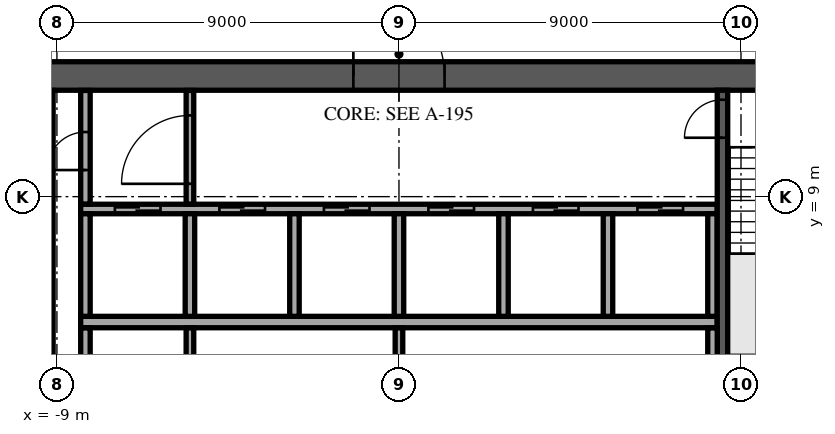
"""IFC4 building model, lengths in metres.
Left out: names, types, materials, properties, quantities, classifications, styles, units other than length and angle.
Written with IfcOpenShell. Run it as: python <this file> out.ifc"""

import sys

from ifc_helpers import new_model, si_unit, direction, frame, frame_2d, origin, place, context, subcontext, project, spatial, rectangle, extrude, element, fill, save


model = new_model("IFC4")
c1 = context("Model", 3, precision=1e-05, world=origin(), true_north=direction((0.0, 1.0)))
c2 = subcontext(c1, "Body", "Model", "MODEL_VIEW")
j1 = project(units=[si_unit("LENGTHUNIT", "METRE"), si_unit("PLANEANGLEUNIT", "RADIAN")], contexts=[c1])
p1 = place(None, origin())
s1 = spatial("IfcSite", under=j1, at=p1, CompositionType="ELEMENT")
p2 = place(p1, origin())
s2 = spatial("IfcBuilding", under=s1, at=p2, CompositionType="ELEMENT")
p3 = place(p2, frame((0.0, 0.0, 242.9)))
s3 = spatial("IfcBuildingStorey", under=s2, at=p3, CompositionType="ELEMENT", Elevation=242.9)
p4 = place(p3, frame((-12.55, 12.175, 0.0), z_axis=(0.0, 0.0, 1.0), x_axis=(1.0, 0.0, 0.0)))
e1 = element("IfcWall", 1, at=p4, inside=s3, PredefinedType="SHEAR", context=c2, shape_type="SweptSolid", body=[
    extrude(rectangle(XDim=25.1, YDim=0.75, at=frame_2d((12.55, 0.0))), origin(), (0.0, 0.0, 1.0), 3.64),
])
p5 = place(p4, frame((11.35, 0.0, 0.0)))
e2 = element("IfcOpeningElement", 2, at=p5, cuts=e1, PredefinedType="OPENING", context=c2, shape_type="SweptSolid", body=[
    extrude(rectangle(XDim=2.4, YDim=2.4, at=frame_2d((1.2, 1.2))), frame((0.0, 0.385, 0.0), z_axis=(0.0, -1.0, 0.0), x_axis=(1.0, 0.0, 0.0)), (0.0, 0.0, 1.0), 0.77),
])
p6 = place(p4, frame((22.175, 0.0, 0.0)))
e3 = element("IfcOpeningElement", 3, at=p6, cuts=e1, PredefinedType="OPENING", context=c2, shape_type="SweptSolid", body=[
    extrude(rectangle(XDim=1.2, YDim=2.1, at=frame_2d((0.6, 1.05))), frame((0.0, 0.385, 0.0), z_axis=(0.0, -1.0, 0.0), x_axis=(1.0, 0.0, 0.0)), (0.0, 0.0, 1.0), 0.77),
])
p7 = place(p4, frame((1.15, 0.0, 0.0)))
e4 = element("IfcOpeningElement", 4, at=p7, cuts=e1, PredefinedType="OPENING", context=c2, shape_type="SweptSolid", body=[
    extrude(rectangle(XDim=1.0, YDim=2.1, at=frame_2d((0.5, 1.05))), frame((0.0, 0.385, 0.0), z_axis=(0.0, -1.0, 0.0), x_axis=(1.0, 0.0, 0.0)), (0.0, 0.0, 1.0), 0.77),
])
p8 = place(p3, frame((-8.375, 5.7, 0.0), z_axis=(0.0, 0.0, 1.0), x_axis=(1.0, 0.0, 0.0)))
e5 = element("IfcWall", 5, at=p8, inside=s3, PredefinedType="SOLIDWALL", context=c2, shape_type="SweptSolid", body=[
    extrude(rectangle(XDim=16.75, YDim=0.3, at=frame_2d((8.375, 0.0))), origin(), (0.0, 0.0, 1.0), 3.64),
])
p9 = place(p3, frame((-8.375, 8.675, 0.0), z_axis=(0.0, 0.0, 1.0), x_axis=(1.0, 0.0, 0.0)))
e6 = element("IfcWall", 6, at=p9, inside=s3, PredefinedType="SOLIDWALL", context=c2, shape_type="SweptSolid", body=[
    extrude(rectangle(XDim=16.75, YDim=0.25, at=frame_2d((8.375, 0.0))), origin(), (0.0, 0.0, 1.0), 3.64),
])
p10 = place(p9, frame((0.9, 0.0, 0.0)))
e7 = element("IfcOpeningElement", 7, at=p10, cuts=e6, PredefinedType="OPENING", context=c2, shape_type="SweptSolid", body=[
    extrude(rectangle(XDim=1.2, YDim=2.1, at=frame_2d((0.6, 1.05))), frame((0.0, 0.135, 0.0), z_axis=(0.0, -1.0, 0.0), x_axis=(1.0, 0.0, 0.0)), (0.0, 0.0, 1.0), 0.27),
])
p11 = place(p9, frame((3.65, 0.0, 0.0)))
e8 = element("IfcOpeningElement", 8, at=p11, cuts=e6, PredefinedType="OPENING", context=c2, shape_type="SweptSolid", body=[
    extrude(rectangle(XDim=1.2, YDim=2.1, at=frame_2d((0.6, 1.05))), frame((0.0, 0.135, 0.0), z_axis=(0.0, -1.0, 0.0), x_axis=(1.0, 0.0, 0.0)), (0.0, 0.0, 1.0), 0.27),
])
p12 = place(p9, frame((6.4, 0.0, 0.0)))
e9 = element("IfcOpeningElement", 9, at=p12, cuts=e6, PredefinedType="OPENING", context=c2, shape_type="SweptSolid", body=[
    extrude(rectangle(XDim=1.2, YDim=2.1, at=frame_2d((0.6, 1.05))), frame((0.0, 0.135, 0.0), z_axis=(0.0, -1.0, 0.0), x_axis=(1.0, 0.0, 0.0)), (0.0, 0.0, 1.0), 0.27),
])
p13 = place(p9, frame((9.15, 0.0, 0.0)))
e10 = element("IfcOpeningElement", 10, at=p13, cuts=e6, PredefinedType="OPENING", context=c2, shape_type="SweptSolid", body=[
    extrude(rectangle(XDim=1.2, YDim=2.1, at=frame_2d((0.6, 1.05))), frame((0.0, 0.135, 0.0), z_axis=(0.0, -1.0, 0.0), x_axis=(1.0, 0.0, 0.0)), (0.0, 0.0, 1.0), 0.27),
])
p14 = place(p9, frame((11.9, 0.0, 0.0)))
e11 = element("IfcOpeningElement", 11, at=p14, cuts=e6, PredefinedType="OPENING", context=c2, shape_type="SweptSolid", body=[
    extrude(rectangle(XDim=1.2, YDim=2.1, at=frame_2d((0.6, 1.05))), frame((0.0, 0.135, 0.0), z_axis=(0.0, -1.0, 0.0), x_axis=(1.0, 0.0, 0.0)), (0.0, 0.0, 1.0), 0.27),
])
p15 = place(p9, frame((14.65, 0.0, 0.0)))
e12 = element("IfcOpeningElement", 12, at=p15, cuts=e6, PredefinedType="OPENING", context=c2, shape_type="SweptSolid", body=[
    extrude(rectangle(XDim=1.2, YDim=2.1, at=frame_2d((0.6, 1.05))), frame((0.0, 0.135, 0.0), z_axis=(0.0, -1.0, 0.0), x_axis=(1.0, 0.0, 0.0)), (0.0, 0.0, 1.0), 0.27),
])
for number, where, z_axis, x_axis in (
    (13, (-8.25, 5.85, 0.0), (0.0, 0.0, 1.0), (0.0, 1.0, 0.0)),
    (14, (-5.5, 5.85, 0.0), (0.0, 0.0, 1.0), (0.0, 1.0, 0.0)),
    (15, (-2.75, 5.85, 0.0), (0.0, 0.0, 1.0), (0.0, 1.0, 0.0)),
    (16, (0.0, 5.85, 0.0), (0.0, 0.0, 1.0), (0.0, 1.0, 0.0)),
    (17, (2.75, 5.85, 0.0), (0.0, 0.0, 1.0), (0.0, 1.0, 0.0)),
    (18, (5.5, 5.85, 0.0), (0.0, 0.0, 1.0), (0.0, 1.0, 0.0)),
    (19, (8.25, 5.85, 0.0), (0.0, 0.0, 1.0), (0.0, 1.0, 0.0)),
):
    element("IfcWall", number, at=place(p3, frame(where, z_axis=z_axis, x_axis=x_axis)), inside=s3, PredefinedType="SOLIDWALL", context=c2, shape_type="SweptSolid", body=[
        extrude(rectangle(XDim=2.7, YDim=0.25, at=frame_2d((1.35, 0.0))), origin(), (0.0, 0.0, 1.0), 3.64),
    ])
p16 = place(p3, frame((8.512, 4.55, 0.0), z_axis=(0.0, 0.0, 1.0), x_axis=(0.0, 1.0, 0.0)))
e20 = element("IfcWall", 20, at=p16, inside=s3, PredefinedType="SOLIDWALL", context=c2, shape_type="SweptSolid", body=[
    extrude(rectangle(XDim=7.25, YDim=0.275, at=frame_2d((3.625, 0.0))), origin(), (0.0, 0.0, 1.0), 3.64),
])
p17 = place(p16, frame((6.0, 0.0, 0.0)))
e21 = element("IfcOpeningElement", 21, at=p17, cuts=e20, PredefinedType="OPENING", context=c2, shape_type="SweptSolid", body=[
    extrude(rectangle(XDim=1.0, YDim=2.1, at=frame_2d((0.5, 1.05))), frame((0.0, 0.147, 0.0), z_axis=(0.0, -1.0, 0.0), x_axis=(1.0, 0.0, 0.0)), (0.0, 0.0, 1.0), 0.295),
])
for number, where, z_axis, x_axis in (
    (22, (-5.5, 2.855, 0.0), (0.0, 0.0, 1.0), (0.0, 1.0, 0.0)),
    (23, (0.0, 2.855, 0.0), (0.0, 0.0, 1.0), (0.0, 1.0, 0.0)),
):
    element("IfcWall", number, at=place(p3, frame(where, z_axis=z_axis, x_axis=x_axis)), inside=s3, PredefinedType="PARTITIONING", context=c2, shape_type="SweptSolid", body=[
        extrude(rectangle(XDim=2.69, YDim=0.2, at=frame_2d((1.345, 0.0))), origin(), (0.0, 0.0, 1.0), 3.64),
    ])
p18 = place(p3, frame((8.25, 2.855, 0.0), z_axis=(0.0, 0.0, 1.0), x_axis=(0.0, 1.0, 0.0)))
e24 = element("IfcWall", 24, at=p18, inside=s3, PredefinedType="PARTITIONING", context=c2, shape_type="SweptSolid", body=[
    extrude(rectangle(XDim=2.69, YDim=0.25, at=frame_2d((1.345, 0.0))), origin(), (0.0, 0.0, 1.0), 3.64),
])
p19 = place(p3, frame((-9.2, 4.78, 0.0), z_axis=(0.0, 0.0, 1.0), x_axis=(0.0, 1.0, 0.0)))
e25 = element("IfcWall", 25, at=p19, inside=s3, PredefinedType="PARTITIONING", context=c2, shape_type="SweptSolid", body=[
    extrude(rectangle(XDim=7.015, YDim=0.2, at=frame_2d((3.507, 0.0))), origin(), (0.0, 0.0, 1.0), 3.64),
])
p20 = place(p19, frame((2.92, 0.0, 0.0)))
e26 = element("IfcOpeningElement", 26, at=p20, cuts=e25, PredefinedType="OPENING", context=c2, shape_type="SweptSolid", body=[
    extrude(rectangle(XDim=1.0, YDim=2.1, at=frame_2d((0.5, 1.05))), frame((0.0, 0.11, 0.0), z_axis=(0.0, -1.0, 0.0), x_axis=(1.0, 0.0, 0.0)), (0.0, 0.0, 1.0), 0.22),
])
p21 = place(p3, frame((-8.25, 4.78, 0.0), z_axis=(0.0, 0.0, 1.0), x_axis=(0.0, 1.0, 0.0)))
e27 = element("IfcWall", 27, at=p21, inside=s3, PredefinedType="PARTITIONING", context=c2, shape_type="SweptSolid", body=[
    extrude(rectangle(XDim=0.765, YDim=0.25, at=frame_2d((0.382, 0.0))), origin(), (0.0, 0.0, 1.0), 3.64),
])
p22 = place(p3, frame((-8.25, 8.805, 0.0), z_axis=(0.0, 0.0, 1.0), x_axis=(0.0, 1.0, 0.0)))
e28 = element("IfcWall", 28, at=p22, inside=s3, PredefinedType="PARTITIONING", context=c2, shape_type="SweptSolid", body=[
    extrude(rectangle(XDim=2.99, YDim=0.25, at=frame_2d((1.495, 0.0))), origin(), (0.0, 0.0, 1.0), 3.64),
])
p23 = place(p22, frame((0.895, 0.0, 0.0)))
e29 = element("IfcOpeningElement", 29, at=p23, cuts=e28, PredefinedType="OPENING", context=c2, shape_type="SweptSolid", body=[
    extrude(rectangle(XDim=1.0, YDim=2.1, at=frame_2d((0.5, 1.05))), frame((0.0, 0.135, 0.0), z_axis=(0.0, -1.0, 0.0), x_axis=(1.0, 0.0, 0.0)), (0.0, 0.0, 1.0), 0.27),
])
p24 = place(p3, frame((-5.5, 8.805, 0.0), z_axis=(0.0, 0.0, 1.0), x_axis=(0.0, 1.0, 0.0)))
e30 = element("IfcWall", 30, at=p24, inside=s3, PredefinedType="PARTITIONING", context=c2, shape_type="SweptSolid", body=[
    extrude(rectangle(XDim=2.99, YDim=0.2, at=frame_2d((1.495, 0.0))), origin(), (0.0, 0.0, 1.0), 3.64),
])
p25 = place(p24, frame((0.532, 0.0, 0.0)))
e31 = element("IfcOpeningElement", 31, at=p25, cuts=e30, PredefinedType="OPENING", context=c2, shape_type="SweptSolid", body=[
    extrude(rectangle(XDim=1.8, YDim=2.1, at=frame_2d((0.9, 1.05))), frame((0.0, 0.11, 0.0), z_axis=(0.0, -1.0, 0.0), x_axis=(1.0, 0.0, 0.0)), (0.0, 0.0, 1.0), 0.22),
])
p26 = place(p3, frame((-5.115, 33.491, 0.0), z_axis=(0.0, 0.0, 1.0), x_axis=(-0.57357740375, -0.819151366908, 0.0)))
e32 = element("IfcWall", 32, at=p26, inside=s3, PredefinedType="STANDARD", context=c2, shape_type="SweptSolid", body=[
    extrude(rectangle(XDim=48.843, YDim=0.6, at=frame_2d((24.422, 0.0))), origin(), (0.0, 0.0, 1.0), 3.64),
])
p27 = place(p26, frame((1.22, 0.0, 0.9)))
e33 = element("IfcOpeningElement", 33, at=p27, cuts=e32, PredefinedType="OPENING", context=c2, shape_type="SweptSolid", body=[
    extrude(rectangle(XDim=2.0, YDim=2.1, at=frame_2d((1.0, 1.05))), frame((0.0, 0.31, 0.0), z_axis=(0.0, -1.0, 0.0), x_axis=(1.0, 0.0, 0.0)), (0.0, 0.0, 1.0), 0.62),
])
p28 = place(p26, frame((5.66, 0.0, 0.9)))
e34 = element("IfcOpeningElement", 34, at=p28, cuts=e32, PredefinedType="OPENING", context=c2, shape_type="SweptSolid", body=[
    extrude(rectangle(XDim=2.0, YDim=2.1, at=frame_2d((1.0, 1.05))), frame((0.0, 0.31, 0.0), z_axis=(0.0, -1.0, 0.0), x_axis=(1.0, 0.0, 0.0)), (0.0, 0.0, 1.0), 0.62),
])
p29 = place(p26, frame((10.101, 0.0, 0.9)))
e35 = element("IfcOpeningElement", 35, at=p29, cuts=e32, PredefinedType="OPENING", context=c2, shape_type="SweptSolid", body=[
    extrude(rectangle(XDim=2.0, YDim=2.1, at=frame_2d((1.0, 1.05))), frame((0.0, 0.31, 0.0), z_axis=(0.0, -1.0, 0.0), x_axis=(1.0, 0.0, 0.0)), (0.0, 0.0, 1.0), 0.62),
])
p30 = place(p26, frame((14.541, 0.0, 0.9)))
e36 = element("IfcOpeningElement", 36, at=p30, cuts=e32, PredefinedType="OPENING", context=c2, shape_type="SweptSolid", body=[
    extrude(rectangle(XDim=2.0, YDim=2.1, at=frame_2d((1.0, 1.05))), frame((0.0, 0.31, 0.0), z_axis=(0.0, -1.0, 0.0), x_axis=(1.0, 0.0, 0.0)), (0.0, 0.0, 1.0), 0.62),
])
p31 = place(p26, frame((18.981, 0.0, 0.9)))
e37 = element("IfcOpeningElement", 37, at=p31, cuts=e32, PredefinedType="OPENING", context=c2, shape_type="SweptSolid", body=[
    extrude(rectangle(XDim=2.0, YDim=2.1, at=frame_2d((1.0, 1.05))), frame((0.0, 0.31, 0.0), z_axis=(0.0, -1.0, 0.0), x_axis=(1.0, 0.0, 0.0)), (0.0, 0.0, 1.0), 0.62),
])
p32 = place(p26, frame((23.422, 0.0, 0.9)))
e38 = element("IfcOpeningElement", 38, at=p32, cuts=e32, PredefinedType="OPENING", context=c2, shape_type="SweptSolid", body=[
    extrude(rectangle(XDim=2.0, YDim=2.1, at=frame_2d((1.0, 1.05))), frame((0.0, 0.31, 0.0), z_axis=(0.0, -1.0, 0.0), x_axis=(1.0, 0.0, 0.0)), (0.0, 0.0, 1.0), 0.62),
])
p33 = place(p26, frame((27.862, 0.0, 0.9)))
e39 = element("IfcOpeningElement", 39, at=p33, cuts=e32, PredefinedType="OPENING", context=c2, shape_type="SweptSolid", body=[
    extrude(rectangle(XDim=2.0, YDim=2.1, at=frame_2d((1.0, 1.05))), frame((0.0, 0.31, 0.0), z_axis=(0.0, -1.0, 0.0), x_axis=(1.0, 0.0, 0.0)), (0.0, 0.0, 1.0), 0.62),
])
p34 = place(p26, frame((32.302, 0.0, 0.9)))
e40 = element("IfcOpeningElement", 40, at=p34, cuts=e32, PredefinedType="OPENING", context=c2, shape_type="SweptSolid", body=[
    extrude(rectangle(XDim=2.0, YDim=2.1, at=frame_2d((1.0, 1.05))), frame((0.0, 0.31, 0.0), z_axis=(0.0, -1.0, 0.0), x_axis=(1.0, 0.0, 0.0)), (0.0, 0.0, 1.0), 0.62),
])
p35 = place(p26, frame((36.742, 0.0, 0.9)))
e41 = element("IfcOpeningElement", 41, at=p35, cuts=e32, PredefinedType="OPENING", context=c2, shape_type="SweptSolid", body=[
    extrude(rectangle(XDim=2.0, YDim=2.1, at=frame_2d((1.0, 1.05))), frame((0.0, 0.31, 0.0), z_axis=(0.0, -1.0, 0.0), x_axis=(1.0, 0.0, 0.0)), (0.0, 0.0, 1.0), 0.62),
])
p36 = place(p26, frame((41.183, 0.0, 0.9)))
e42 = element("IfcOpeningElement", 42, at=p36, cuts=e32, PredefinedType="OPENING", context=c2, shape_type="SweptSolid", body=[
    extrude(rectangle(XDim=2.0, YDim=2.1, at=frame_2d((1.0, 1.05))), frame((0.0, 0.31, 0.0), z_axis=(0.0, -1.0, 0.0), x_axis=(1.0, 0.0, 0.0)), (0.0, 0.0, 1.0), 0.62),
])
p37 = place(p26, frame((45.623, 0.0, 0.9)))
e43 = element("IfcOpeningElement", 43, at=p37, cuts=e32, PredefinedType="OPENING", context=c2, shape_type="SweptSolid", body=[
    extrude(rectangle(XDim=2.0, YDim=2.1, at=frame_2d((1.0, 1.05))), frame((0.0, 0.31, 0.0), z_axis=(0.0, -1.0, 0.0), x_axis=(1.0, 0.0, 0.0)), (0.0, 0.0, 1.0), 0.62),
])
p38 = place(p3, frame((5.206, -33.362, 0.0), z_axis=(0.0, 0.0, 1.0), x_axis=(0.573577438409, 0.81915134264, 0.0)))
e44 = element("IfcWall", 44, at=p38, inside=s3, PredefinedType="STANDARD", context=c2, shape_type="SweptSolid", body=[
    extrude(rectangle(XDim=48.686, YDim=0.6, at=frame_2d((24.343, 0.0))), origin(), (0.0, 0.0, 1.0), 3.64),
])
p39 = place(p38, frame((1.213, 0.0, 0.9)))
e45 = element("IfcOpeningElement", 45, at=p39, cuts=e44, PredefinedType="OPENING", context=c2, shape_type="SweptSolid", body=[
    extrude(rectangle(XDim=2.0, YDim=2.1, at=frame_2d((1.0, 1.05))), frame((0.0, 0.31, 0.0), z_axis=(0.0, -1.0, 0.0), x_axis=(1.0, 0.0, 0.0)), (0.0, 0.0, 1.0), 0.62),
])
p40 = place(p38, frame((5.639, 0.0, 0.9)))
e46 = element("IfcOpeningElement", 46, at=p40, cuts=e44, PredefinedType="OPENING", context=c2, shape_type="SweptSolid", body=[
    extrude(rectangle(XDim=2.0, YDim=2.1, at=frame_2d((1.0, 1.05))), frame((0.0, 0.31, 0.0), z_axis=(0.0, -1.0, 0.0), x_axis=(1.0, 0.0, 0.0)), (0.0, 0.0, 1.0), 0.62),
])
p41 = place(p38, frame((10.065, 0.0, 0.9)))
e47 = element("IfcOpeningElement", 47, at=p41, cuts=e44, PredefinedType="OPENING", context=c2, shape_type="SweptSolid", body=[
    extrude(rectangle(XDim=2.0, YDim=2.1, at=frame_2d((1.0, 1.05))), frame((0.0, 0.31, 0.0), z_axis=(0.0, -1.0, 0.0), x_axis=(1.0, 0.0, 0.0)), (0.0, 0.0, 1.0), 0.62),
])
p42 = place(p38, frame((14.491, 0.0, 0.9)))
e48 = element("IfcOpeningElement", 48, at=p42, cuts=e44, PredefinedType="OPENING", context=c2, shape_type="SweptSolid", body=[
    extrude(rectangle(XDim=2.0, YDim=2.1, at=frame_2d((1.0, 1.05))), frame((0.0, 0.31, 0.0), z_axis=(0.0, -1.0, 0.0), x_axis=(1.0, 0.0, 0.0)), (0.0, 0.0, 1.0), 0.62),
])
p43 = place(p38, frame((18.917, 0.0, 0.9)))
e49 = element("IfcOpeningElement", 49, at=p43, cuts=e44, PredefinedType="OPENING", context=c2, shape_type="SweptSolid", body=[
    extrude(rectangle(XDim=2.0, YDim=2.1, at=frame_2d((1.0, 1.05))), frame((0.0, 0.31, 0.0), z_axis=(0.0, -1.0, 0.0), x_axis=(1.0, 0.0, 0.0)), (0.0, 0.0, 1.0), 0.62),
])
p44 = place(p38, frame((23.343, 0.0, 0.9)))
e50 = element("IfcOpeningElement", 50, at=p44, cuts=e44, PredefinedType="OPENING", context=c2, shape_type="SweptSolid", body=[
    extrude(rectangle(XDim=2.0, YDim=2.1, at=frame_2d((1.0, 1.05))), frame((0.0, 0.31, 0.0), z_axis=(0.0, -1.0, 0.0), x_axis=(1.0, 0.0, 0.0)), (0.0, 0.0, 1.0), 0.62),
])
p45 = place(p38, frame((27.769, 0.0, 0.9)))
e51 = element("IfcOpeningElement", 51, at=p45, cuts=e44, PredefinedType="OPENING", context=c2, shape_type="SweptSolid", body=[
    extrude(rectangle(XDim=2.0, YDim=2.1, at=frame_2d((1.0, 1.05))), frame((0.0, 0.31, 0.0), z_axis=(0.0, -1.0, 0.0), x_axis=(1.0, 0.0, 0.0)), (0.0, 0.0, 1.0), 0.62),
])
p46 = place(p38, frame((32.195, 0.0, 0.9)))
e52 = element("IfcOpeningElement", 52, at=p46, cuts=e44, PredefinedType="OPENING", context=c2, shape_type="SweptSolid", body=[
    extrude(rectangle(XDim=2.0, YDim=2.1, at=frame_2d((1.0, 1.05))), frame((0.0, 0.31, 0.0), z_axis=(0.0, -1.0, 0.0), x_axis=(1.0, 0.0, 0.0)), (0.0, 0.0, 1.0), 0.62),
])
p47 = place(p38, frame((36.621, 0.0, 0.9)))
e53 = element("IfcOpeningElement", 53, at=p47, cuts=e44, PredefinedType="OPENING", context=c2, shape_type="SweptSolid", body=[
    extrude(rectangle(XDim=2.0, YDim=2.1, at=frame_2d((1.0, 1.05))), frame((0.0, 0.31, 0.0), z_axis=(0.0, -1.0, 0.0), x_axis=(1.0, 0.0, 0.0)), (0.0, 0.0, 1.0), 0.62),
])
p48 = place(p38, frame((41.047, 0.0, 0.9)))
e54 = element("IfcOpeningElement", 54, at=p48, cuts=e44, PredefinedType="OPENING", context=c2, shape_type="SweptSolid", body=[
    extrude(rectangle(XDim=2.0, YDim=2.1, at=frame_2d((1.0, 1.05))), frame((0.0, 0.31, 0.0), z_axis=(0.0, -1.0, 0.0), x_axis=(1.0, 0.0, 0.0)), (0.0, 0.0, 1.0), 0.62),
])
p49 = place(p38, frame((45.473, 0.0, 0.9)))
e55 = element("IfcOpeningElement", 55, at=p49, cuts=e44, PredefinedType="OPENING", context=c2, shape_type="SweptSolid", body=[
    extrude(rectangle(XDim=2.0, YDim=2.1, at=frame_2d((1.0, 1.05))), frame((0.0, 0.31, 0.0), z_axis=(0.0, -1.0, 0.0), x_axis=(1.0, 0.0, 0.0)), (0.0, 0.0, 1.0), 0.62),
])
p50 = place(p3, frame((-1.89, 27.226, 0.0), z_axis=(0.0, 0.0, 1.0), x_axis=(0.819163235761, -0.573560452941, 0.0)))
e56 = element("IfcWall", 56, at=p50, inside=s3, PredefinedType="PARTITIONING", context=c2, shape_type="SweptSolid", body=[
    extrude(rectangle(XDim=34.403, YDim=0.15, at=frame_2d((17.202, 0.0))), origin(), (0.0, 0.0, 1.0), 3.24),
])
p51 = place(p50, frame((7.427, 0.0, 0.0)))
e57 = element("IfcOpeningElement", 57, at=p51, cuts=e56, PredefinedType="OPENING", context=c2, shape_type="SweptSolid", body=[
    extrude(rectangle(XDim=1.0, YDim=2.1, at=frame_2d((0.5, 1.05))), frame((0.0, 0.085, 0.0), z_axis=(0.0, -1.0, 0.0), x_axis=(1.0, 0.0, 0.0)), (0.0, 0.0, 1.0), 0.17),
])
p52 = place(p50, frame((15.173, 0.0, 0.0)))
e58 = element("IfcOpeningElement", 58, at=p52, cuts=e56, PredefinedType="OPENING", context=c2, shape_type="SweptSolid", body=[
    extrude(rectangle(XDim=1.0, YDim=2.1, at=frame_2d((0.5, 1.05))), frame((0.0, 0.085, 0.0), z_axis=(0.0, -1.0, 0.0), x_axis=(1.0, 0.0, 0.0)), (0.0, 0.0, 1.0), 0.17),
])
p53 = place(p50, frame((19.273, 0.0, 0.0)))
e59 = element("IfcOpeningElement", 59, at=p53, cuts=e56, PredefinedType="OPENING", context=c2, shape_type="SweptSolid", body=[
    extrude(rectangle(XDim=1.0, YDim=2.1, at=frame_2d((0.5, 1.05))), frame((0.0, 0.085, 0.0), z_axis=(0.0, -1.0, 0.0), x_axis=(1.0, 0.0, 0.0)), (0.0, 0.0, 1.0), 0.17),
])
p54 = place(p5, origin())
e60 = element("IfcDoor", 60, at=p54, inside=s3, OperationType="SINGLE_SWING_LEFT", PredefinedType="DOOR", context=c2, shape_type="SweptSolid", body=[
    extrude(rectangle(XDim=2.4, YDim=2.4, at=frame_2d((1.2, 1.2))), frame((0.0, 0.025, 0.0), z_axis=(0.0, -1.0, 0.0), x_axis=(1.0, 0.0, 0.0)), (0.0, 0.0, 1.0), 0.05),
])
fill(e2, e60)
p55 = place(p10, origin())
e61 = element("IfcDoor", 61, at=p55, inside=s3, OperationType="DOUBLE_DOOR_SLIDING", PredefinedType="DOOR", context=c2, shape_type="SweptSolid", body=[
    extrude(rectangle(XDim=1.2, YDim=2.1, at=frame_2d((0.6, 1.05))), frame((0.0, 0.025, 0.0), z_axis=(0.0, -1.0, 0.0), x_axis=(1.0, 0.0, 0.0)), (0.0, 0.0, 1.0), 0.05),
])
fill(e7, e61)
p56 = place(p11, origin())
e62 = element("IfcDoor", 62, at=p56, inside=s3, OperationType="DOUBLE_DOOR_SLIDING", PredefinedType="DOOR", context=c2, shape_type="SweptSolid", body=[
    extrude(rectangle(XDim=1.2, YDim=2.1, at=frame_2d((0.6, 1.05))), frame((0.0, 0.025, 0.0), z_axis=(0.0, -1.0, 0.0), x_axis=(1.0, 0.0, 0.0)), (0.0, 0.0, 1.0), 0.05),
])
fill(e8, e62)
p57 = place(p12, origin())
e63 = element("IfcDoor", 63, at=p57, inside=s3, OperationType="DOUBLE_DOOR_SLIDING", PredefinedType="DOOR", context=c2, shape_type="SweptSolid", body=[
    extrude(rectangle(XDim=1.2, YDim=2.1, at=frame_2d((0.6, 1.05))), frame((0.0, 0.025, 0.0), z_axis=(0.0, -1.0, 0.0), x_axis=(1.0, 0.0, 0.0)), (0.0, 0.0, 1.0), 0.05),
])
fill(e9, e63)
p58 = place(p13, origin())
e64 = element("IfcDoor", 64, at=p58, inside=s3, OperationType="DOUBLE_DOOR_SLIDING", PredefinedType="DOOR", context=c2, shape_type="SweptSolid", body=[
    extrude(rectangle(XDim=1.2, YDim=2.1, at=frame_2d((0.6, 1.05))), frame((0.0, 0.025, 0.0), z_axis=(0.0, -1.0, 0.0), x_axis=(1.0, 0.0, 0.0)), (0.0, 0.0, 1.0), 0.05),
])
fill(e10, e64)
p59 = place(p14, origin())
e65 = element("IfcDoor", 65, at=p59, inside=s3, OperationType="DOUBLE_DOOR_SLIDING", PredefinedType="DOOR", context=c2, shape_type="SweptSolid", body=[
    extrude(rectangle(XDim=1.2, YDim=2.1, at=frame_2d((0.6, 1.05))), frame((0.0, 0.025, 0.0), z_axis=(0.0, -1.0, 0.0), x_axis=(1.0, 0.0, 0.0)), (0.0, 0.0, 1.0), 0.05),
])
fill(e11, e65)
p60 = place(p15, origin())
e66 = element("IfcDoor", 66, at=p60, inside=s3, OperationType="DOUBLE_DOOR_SLIDING", PredefinedType="DOOR", context=c2, shape_type="SweptSolid", body=[
    extrude(rectangle(XDim=1.2, YDim=2.1, at=frame_2d((0.6, 1.05))), frame((0.0, 0.025, 0.0), z_axis=(0.0, -1.0, 0.0), x_axis=(1.0, 0.0, 0.0)), (0.0, 0.0, 1.0), 0.05),
])
fill(e12, e66)
p61 = place(p17, origin())
e67 = element("IfcDoor", 67, at=p61, inside=s3, OperationType="SINGLE_SWING_LEFT", PredefinedType="DOOR", context=c2, shape_type="SweptSolid", body=[
    extrude(rectangle(XDim=1.0, YDim=2.1, at=frame_2d((0.5, 1.05))), frame((0.0, 0.025, 0.0), z_axis=(0.0, -1.0, 0.0), x_axis=(1.0, 0.0, 0.0)), (0.0, 0.0, 1.0), 0.05),
])
fill(e21, e67)
p62 = place(p23, origin())
e68 = element("IfcDoor", 68, at=p62, inside=s3, OperationType="SINGLE_SWING_RIGHT", PredefinedType="DOOR", context=c2, shape_type="SweptSolid", body=[
    extrude(rectangle(XDim=1.0, YDim=2.1, at=frame_2d((0.5, 1.05))), frame((0.0, 0.025, 0.0), z_axis=(0.0, -1.0, 0.0), x_axis=(1.0, 0.0, 0.0)), (0.0, 0.0, 1.0), 0.05),
])
fill(e29, e68)
p63 = place(p25, origin())
e69 = element("IfcDoor", 69, at=p63, inside=s3, OperationType="SINGLE_SWING_LEFT", PredefinedType="DOOR", context=c2, shape_type="SweptSolid", body=[
    extrude(rectangle(XDim=1.8, YDim=2.1, at=frame_2d((0.9, 1.05))), frame((0.0, 0.025, 0.0), z_axis=(0.0, -1.0, 0.0), x_axis=(1.0, 0.0, 0.0)), (0.0, 0.0, 1.0), 0.05),
])
fill(e31, e69)
save(model, sys.argv[1])
